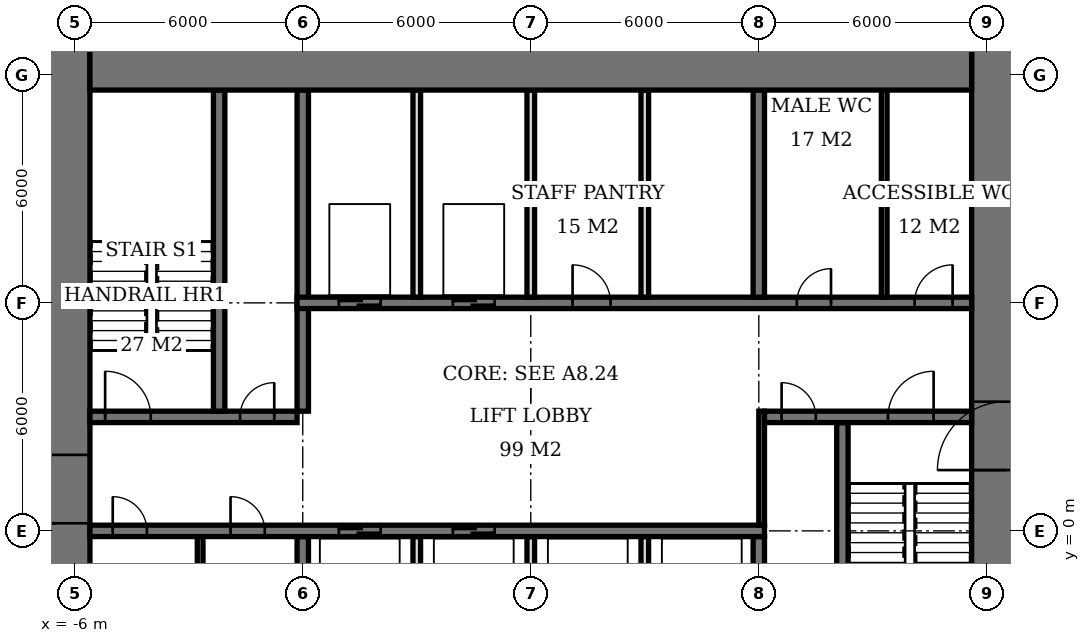
"""IFC4 building model, lengths in metres.
Left out: names, types, materials, properties, quantities, classifications, styles, units other than length and angle.
Written with IfcOpenShell. Run it as: python <this file> out.ifc"""

import sys

from ifc_helpers import new_model, si_unit, direction, frame, frame_2d, origin, place, context, subcontext, project, spatial, rectangle, extrude, element, fill, save


model = new_model("IFC4")
c1 = context("Model", 3, precision=1e-05, world=origin(), true_north=direction((0.0, 1.0)))
c2 = subcontext(c1, "Body", "Model", "MODEL_VIEW")
j1 = project(units=[si_unit("LENGTHUNIT", "METRE"), si_unit("PLANEANGLEUNIT", "RADIAN")], contexts=[c1])
p1 = place(None, origin())
s1 = spatial("IfcSite", under=j1, at=p1, CompositionType="ELEMENT")
p2 = place(p1, origin())
s2 = spatial("IfcBuilding", under=s1, at=p2, CompositionType="ELEMENT")
p3 = place(p2, frame((0.0, 0.0, 121.1)))
s3 = spatial("IfcBuildingStorey", under=s2, at=p3, CompositionType="ELEMENT", Elevation=121.1)
p4 = place(p3, frame((-5.6, 12.6, 0.0), z_axis=(0.0, 0.0, 1.0), x_axis=(1.0, 0.0, 0.0)))
e1 = element("IfcWall", 1, at=p4, inside=s3, PredefinedType="SHEAR", context=c2, shape_type="SweptSolid", body=[
    extrude(rectangle(XDim=23.2, YDim=2.0, at=frame_2d((11.6, 0.0))), origin(), (0.0, 0.0, 1.0), 3.9),
])
p5 = place(p3, frame((-6.5, -7.6, 0.0), z_axis=(0.0, 0.0, 1.0), x_axis=(0.0, 1.0, 0.0)))
e2 = element("IfcWall", 2, at=p5, inside=s3, PredefinedType="SHEAR", context=c2, shape_type="SweptSolid", body=[
    extrude(rectangle(XDim=21.2, YDim=1.8, at=frame_2d((10.6, 0.0))), origin(), (0.0, 0.0, 1.0), 3.9),
])
p6 = place(p5, frame((7.8, 0.0, 0.0)))
e3 = element("IfcOpeningElement", 3, at=p6, cuts=e2, PredefinedType="OPENING", context=c2, shape_type="SweptSolid", body=[
    extrude(rectangle(XDim=1.8, YDim=2.4, at=frame_2d((0.9, 1.2))), frame((0.0, 0.91, 0.0), z_axis=(0.0, -1.0, 0.0), x_axis=(1.0, 0.0, 0.0)), (0.0, 0.0, 1.0), 1.82),
])
p7 = place(p3, frame((18.5, -7.6, 0.0), z_axis=(0.0, 0.0, 1.0), x_axis=(0.0, 1.0, 0.0)))
e4 = element("IfcWall", 4, at=p7, inside=s3, PredefinedType="SHEAR", context=c2, shape_type="SweptSolid", body=[
    extrude(rectangle(XDim=21.2, YDim=1.8, at=frame_2d((10.6, 0.0))), origin(), (0.0, 0.0, 1.0), 3.9),
])
p8 = place(p7, frame((9.2, 0.0, 0.0)))
e5 = element("IfcOpeningElement", 5, at=p8, cuts=e4, PredefinedType="OPENING", context=c2, shape_type="SweptSolid", body=[
    extrude(rectangle(XDim=1.8, YDim=2.4, at=frame_2d((0.9, 1.2))), frame((0.0, 0.91, 0.0), z_axis=(0.0, -1.0, 0.0), x_axis=(1.0, 0.0, 0.0)), (0.0, 0.0, 1.0), 1.82),
])
p9 = place(p3, frame((-5.6, 0.0, 0.0), z_axis=(0.0, 0.0, 1.0), x_axis=(1.0, 0.0, 0.0)))
e6 = element("IfcWall", 6, at=p9, inside=s3, PredefinedType="SHEAR", context=c2, shape_type="SweptSolid", body=[
    extrude(rectangle(XDim=17.75, YDim=0.3, at=frame_2d((8.875, 0.0))), origin(), (0.0, 0.0, 1.0), 3.9),
])
p10 = place(p9, frame((0.6, 0.0, 0.0)))
e7 = element("IfcOpeningElement", 7, at=p10, cuts=e6, PredefinedType="OPENING", context=c2, shape_type="SweptSolid", body=[
    extrude(rectangle(XDim=0.9, YDim=2.1, at=frame_2d((0.45, 1.05))), frame((0.0, 0.16, 0.0), z_axis=(0.0, -1.0, 0.0), x_axis=(1.0, 0.0, 0.0)), (0.0, 0.0, 1.0), 0.32),
])
p11 = place(p9, frame((3.7, 0.0, 0.0)))
e8 = element("IfcOpeningElement", 8, at=p11, cuts=e6, PredefinedType="OPENING", context=c2, shape_type="SweptSolid", body=[
    extrude(rectangle(XDim=0.9, YDim=2.1, at=frame_2d((0.45, 1.05))), frame((0.0, 0.16, 0.0), z_axis=(0.0, -1.0, 0.0), x_axis=(1.0, 0.0, 0.0)), (0.0, 0.0, 1.0), 0.32),
])
p12 = place(p9, frame((6.55, 0.0, 0.0)))
e9 = element("IfcOpeningElement", 9, at=p12, cuts=e6, PredefinedType="OPENING", context=c2, shape_type="SweptSolid", body=[
    extrude(rectangle(XDim=1.1, YDim=2.1, at=frame_2d((0.55, 1.05))), frame((0.0, 0.16, 0.0), z_axis=(0.0, -1.0, 0.0), x_axis=(1.0, 0.0, 0.0)), (0.0, 0.0, 1.0), 0.32),
])
p13 = place(p9, frame((9.55, 0.0, 0.0)))
e10 = element("IfcOpeningElement", 10, at=p13, cuts=e6, PredefinedType="OPENING", context=c2, shape_type="SweptSolid", body=[
    extrude(rectangle(XDim=1.1, YDim=2.1, at=frame_2d((0.55, 1.05))), frame((0.0, 0.16, 0.0), z_axis=(0.0, -1.0, 0.0), x_axis=(1.0, 0.0, 0.0)), (0.0, 0.0, 1.0), 0.32),
])
p14 = place(p3, frame((-5.6, 3.0, 0.0), z_axis=(0.0, 0.0, 1.0), x_axis=(1.0, 0.0, 0.0)))
e11 = element("IfcWall", 11, at=p14, inside=s3, PredefinedType="SHEAR", context=c2, shape_type="SweptSolid", body=[
    extrude(rectangle(XDim=5.45, YDim=0.3, at=frame_2d((2.725, 0.0))), origin(), (0.0, 0.0, 1.0), 3.9),
])
p15 = place(p14, frame((0.4, 0.0, 0.0)))
e12 = element("IfcOpeningElement", 12, at=p15, cuts=e11, PredefinedType="OPENING", context=c2, shape_type="SweptSolid", body=[
    extrude(rectangle(XDim=1.2, YDim=2.1, at=frame_2d((0.6, 1.05))), frame((0.0, 0.16, 0.0), z_axis=(0.0, -1.0, 0.0), x_axis=(1.0, 0.0, 0.0)), (0.0, 0.0, 1.0), 0.32),
])
p16 = place(p14, frame((3.95, 0.0, 0.0)))
e13 = element("IfcOpeningElement", 13, at=p16, cuts=e11, PredefinedType="OPENING", context=c2, shape_type="SweptSolid", body=[
    extrude(rectangle(XDim=0.9, YDim=2.1, at=frame_2d((0.45, 1.05))), frame((0.0, 0.16, 0.0), z_axis=(0.0, -1.0, 0.0), x_axis=(1.0, 0.0, 0.0)), (0.0, 0.0, 1.0), 0.32),
])
p17 = place(p3, frame((12.15, 3.0, 0.0), z_axis=(0.0, 0.0, 1.0), x_axis=(1.0, 0.0, 0.0)))
e14 = element("IfcWall", 14, at=p17, inside=s3, PredefinedType="SHEAR", context=c2, shape_type="SweptSolid", body=[
    extrude(rectangle(XDim=5.45, YDim=0.3, at=frame_2d((2.725, 0.0))), origin(), (0.0, 0.0, 1.0), 3.9),
])
p18 = place(p17, frame((3.25, 0.0, 0.0)))
e15 = element("IfcOpeningElement", 15, at=p18, cuts=e14, PredefinedType="OPENING", context=c2, shape_type="SweptSolid", body=[
    extrude(rectangle(XDim=1.2, YDim=2.1, at=frame_2d((0.6, 1.05))), frame((0.0, 0.16, 0.0), z_axis=(0.0, -1.0, 0.0), x_axis=(1.0, 0.0, 0.0)), (0.0, 0.0, 1.0), 0.32),
])
p19 = place(p17, frame((0.45, 0.0, 0.0)))
e16 = element("IfcOpeningElement", 16, at=p19, cuts=e14, PredefinedType="OPENING", context=c2, shape_type="SweptSolid", body=[
    extrude(rectangle(XDim=0.9, YDim=2.1, at=frame_2d((0.45, 1.05))), frame((0.0, 0.16, 0.0), z_axis=(0.0, -1.0, 0.0), x_axis=(1.0, 0.0, 0.0)), (0.0, 0.0, 1.0), 0.32),
])
p20 = place(p3, frame((-0.15, 6.0, 0.0), z_axis=(0.0, 0.0, 1.0), x_axis=(1.0, 0.0, 0.0)))
e17 = element("IfcWall", 17, at=p20, inside=s3, PredefinedType="SHEAR", context=c2, shape_type="SweptSolid", body=[
    extrude(rectangle(XDim=17.75, YDim=0.3, at=frame_2d((8.875, 0.0))), origin(), (0.0, 0.0, 1.0), 3.9),
])
p21 = place(p20, frame((13.15, 0.0, 0.0)))
e18 = element("IfcOpeningElement", 18, at=p21, cuts=e17, PredefinedType="OPENING", context=c2, shape_type="SweptSolid", body=[
    extrude(rectangle(XDim=0.9, YDim=2.1, at=frame_2d((0.45, 1.05))), frame((0.0, 0.16, 0.0), z_axis=(0.0, -1.0, 0.0), x_axis=(1.0, 0.0, 0.0)), (0.0, 0.0, 1.0), 0.32),
])
p22 = place(p20, frame((16.25, 0.0, 0.0)))
e19 = element("IfcOpeningElement", 19, at=p22, cuts=e17, PredefinedType="OPENING", context=c2, shape_type="SweptSolid", body=[
    extrude(rectangle(XDim=1.0, YDim=2.1, at=frame_2d((0.5, 1.05))), frame((0.0, 0.16, 0.0), z_axis=(0.0, -1.0, 0.0), x_axis=(1.0, 0.0, 0.0)), (0.0, 0.0, 1.0), 0.32),
])
p23 = place(p20, frame((7.25, 0.0, 0.0)))
e20 = element("IfcOpeningElement", 20, at=p23, cuts=e17, PredefinedType="OPENING", context=c2, shape_type="SweptSolid", body=[
    extrude(rectangle(XDim=1.0, YDim=2.1, at=frame_2d((0.5, 1.05))), frame((0.0, 0.16, 0.0), z_axis=(0.0, -1.0, 0.0), x_axis=(1.0, 0.0, 0.0)), (0.0, 0.0, 1.0), 0.32),
])
p24 = place(p20, frame((1.1, 0.0, 0.0)))
e21 = element("IfcOpeningElement", 21, at=p24, cuts=e17, PredefinedType="OPENING", context=c2, shape_type="SweptSolid", body=[
    extrude(rectangle(XDim=1.1, YDim=2.1, at=frame_2d((0.55, 1.05))), frame((0.0, 0.16, 0.0), z_axis=(0.0, -1.0, 0.0), x_axis=(1.0, 0.0, 0.0)), (0.0, 0.0, 1.0), 0.32),
])
p25 = place(p20, frame((4.1, 0.0, 0.0)))
e22 = element("IfcOpeningElement", 22, at=p25, cuts=e17, PredefinedType="OPENING", context=c2, shape_type="SweptSolid", body=[
    extrude(rectangle(XDim=1.1, YDim=2.1, at=frame_2d((0.55, 1.05))), frame((0.0, 0.16, 0.0), z_axis=(0.0, -1.0, 0.0), x_axis=(1.0, 0.0, 0.0)), (0.0, 0.0, 1.0), 0.32),
])
p26 = place(p3, frame((0.0, -5.6, 0.0), z_axis=(0.0, 0.0, 1.0), x_axis=(0.0, 1.0, 0.0)))
e23 = element("IfcWall", 23, at=p26, inside=s3, PredefinedType="SHEAR", context=c2, shape_type="SweptSolid", body=[
    extrude(rectangle(XDim=5.45, YDim=0.3, at=frame_2d((2.725, 0.0))), origin(), (0.0, 0.0, 1.0), 3.9),
])
p27 = place(p3, frame((0.0, 3.15, 0.0), z_axis=(0.0, 0.0, 1.0), x_axis=(0.0, 1.0, 0.0)))
e24 = element("IfcWall", 24, at=p27, inside=s3, PredefinedType="SHEAR", context=c2, shape_type="SweptSolid", body=[
    extrude(rectangle(XDim=8.45, YDim=0.3, at=frame_2d((4.225, 0.0))), origin(), (0.0, 0.0, 1.0), 3.9),
])
for number, where, z_axis, x_axis in (
    (25, (12.0, -5.6, 0.0), (0.0, 0.0, 1.0), (0.0, 1.0, 0.0)),
    (26, (12.0, 6.15, 0.0), (0.0, 0.0, 1.0), (0.0, 1.0, 0.0)),
):
    element("IfcWall", number, at=place(p3, frame(where, z_axis=z_axis, x_axis=x_axis)), inside=s3, PredefinedType="SHEAR", context=c2, shape_type="SweptSolid", body=[
        extrude(rectangle(XDim=5.45, YDim=0.3, at=frame_2d((2.725, 0.0))), origin(), (0.0, 0.0, 1.0), 3.9),
    ])
for number, where, z_axis, x_axis in (
    (27, (-2.2, 3.15, 0.0), (0.0, 0.0, 1.0), (0.0, 1.0, 0.0)),
    (28, (14.2, -5.6, 0.0), (0.0, 0.0, 1.0), (0.0, 1.0, 0.0)),
):
    element("IfcWall", number, at=place(p3, frame(where, z_axis=z_axis, x_axis=x_axis)), inside=s3, PredefinedType="SHEAR", context=c2, shape_type="SweptSolid", body=[
        extrude(rectangle(XDim=8.45, YDim=0.3, at=frame_2d((4.225, 0.0))), origin(), (0.0, 0.0, 1.0), 3.9),
    ])
for number, where, z_axis, x_axis in (
    (29, (3.0, 6.15, 0.0), (0.0, 0.0, 1.0), (0.0, 1.0, 0.0)),
    (30, (6.0, 6.15, 0.0), (0.0, 0.0, 1.0), (0.0, 1.0, 0.0)),
    (31, (9.0, 6.15, 0.0), (0.0, 0.0, 1.0), (0.0, 1.0, 0.0)),
    (32, (3.0, -5.6, 0.0), (0.0, 0.0, 1.0), (0.0, 1.0, 0.0)),
    (33, (6.0, -5.6, 0.0), (0.0, 0.0, 1.0), (0.0, 1.0, 0.0)),
    (34, (9.0, -5.6, 0.0), (0.0, 0.0, 1.0), (0.0, 1.0, 0.0)),
):
    element("IfcWall", number, at=place(p3, frame(where, z_axis=z_axis, x_axis=x_axis)), inside=s3, PredefinedType="SOLIDWALL", context=c2, shape_type="SweptSolid", body=[
        extrude(rectangle(XDim=5.45, YDim=0.2, at=frame_2d((2.725, 0.0))), origin(), (0.0, 0.0, 1.0), 3.9),
    ])
for number, where, z_axis, x_axis in (
    (35, (-2.7, -5.6, 0.0), (0.0, 0.0, 1.0), (0.0, 1.0, 0.0)),
    (36, (15.3, 6.15, 0.0), (0.0, 0.0, 1.0), (0.0, 1.0, 0.0)),
):
    element("IfcWall", number, at=place(p3, frame(where, z_axis=z_axis, x_axis=x_axis)), inside=s3, PredefinedType="PLUMBINGWALL", context=c2, shape_type="SweptSolid", body=[
        extrude(rectangle(XDim=5.45, YDim=0.15, at=frame_2d((2.725, 0.0))), origin(), (0.0, 0.0, 1.0), 3.65),
    ])
p28 = place(p3, frame((12.075, 0.15, 0.0), z_axis=(0.0, 0.0, 1.0), x_axis=(0.0, 1.0, 0.0)))
e37 = element("IfcWall", 37, at=p28, inside=s3, PredefinedType="PARTITIONING", context=c2, shape_type="SweptSolid", body=[
    extrude(rectangle(XDim=3.0, YDim=0.15, at=frame_2d((1.5, 0.0))), origin(), (0.0, 0.0, 1.0), 3.65),
])
p29 = place(p6, origin())
e38 = element("IfcDoor", 38, at=p29, inside=s3, OperationType="DOUBLE_DOOR_SINGLE_SWING", PredefinedType="DOOR", context=c2, shape_type="SweptSolid", body=[
    extrude(rectangle(XDim=1.8, YDim=2.4, at=frame_2d((0.9, 1.2))), frame((0.0, 0.025, 0.0), z_axis=(0.0, -1.0, 0.0), x_axis=(1.0, 0.0, 0.0)), (0.0, 0.0, 1.0), 0.05),
])
fill(e3, e38)
p30 = place(p8, origin())
e39 = element("IfcDoor", 39, at=p30, inside=s3, OperationType="DOUBLE_DOOR_SINGLE_SWING", PredefinedType="DOOR", context=c2, shape_type="SweptSolid", body=[
    extrude(rectangle(XDim=1.8, YDim=2.4, at=frame_2d((0.9, 1.2))), frame((0.0, 0.025, 0.0), z_axis=(0.0, -1.0, 0.0), x_axis=(1.0, 0.0, 0.0)), (0.0, 0.0, 1.0), 0.05),
])
fill(e5, e39)
p31 = place(p15, origin())
e40 = element("IfcDoor", 40, at=p31, inside=s3, OperationType="SINGLE_SWING_LEFT", PredefinedType="DOOR", context=c2, shape_type="SweptSolid", body=[
    extrude(rectangle(XDim=1.2, YDim=2.1, at=frame_2d((0.6, 1.05))), frame((0.0, 0.025, 0.0), z_axis=(0.0, -1.0, 0.0), x_axis=(1.0, 0.0, 0.0)), (0.0, 0.0, 1.0), 0.05),
])
fill(e12, e40)
p32 = place(p16, origin())
e41 = element("IfcDoor", 41, at=p32, inside=s3, OperationType="SINGLE_SWING_RIGHT", PredefinedType="DOOR", context=c2, shape_type="SweptSolid", body=[
    extrude(rectangle(XDim=0.9, YDim=2.1, at=frame_2d((0.45, 1.05))), frame((0.0, 0.025, 0.0), z_axis=(0.0, -1.0, 0.0), x_axis=(1.0, 0.0, 0.0)), (0.0, 0.0, 1.0), 0.05),
])
fill(e13, e41)
p33 = place(p18, origin())
e42 = element("IfcDoor", 42, at=p33, inside=s3, OperationType="SINGLE_SWING_RIGHT", PredefinedType="DOOR", context=c2, shape_type="SweptSolid", body=[
    extrude(rectangle(XDim=1.2, YDim=2.1, at=frame_2d((0.6, 1.05))), frame((0.0, 0.025, 0.0), z_axis=(0.0, -1.0, 0.0), x_axis=(1.0, 0.0, 0.0)), (0.0, 0.0, 1.0), 0.05),
])
fill(e15, e42)
p34 = place(p19, origin())
e43 = element("IfcDoor", 43, at=p34, inside=s3, OperationType="SINGLE_SWING_LEFT", PredefinedType="DOOR", context=c2, shape_type="SweptSolid", body=[
    extrude(rectangle(XDim=0.9, YDim=2.1, at=frame_2d((0.45, 1.05))), frame((0.0, 0.025, 0.0), z_axis=(0.0, -1.0, 0.0), x_axis=(1.0, 0.0, 0.0)), (0.0, 0.0, 1.0), 0.05),
])
fill(e16, e43)
p35 = place(p10, origin())
e44 = element("IfcDoor", 44, at=p35, inside=s3, OperationType="SINGLE_SWING_LEFT", PredefinedType="DOOR", context=c2, shape_type="SweptSolid", body=[
    extrude(rectangle(XDim=0.9, YDim=2.1, at=frame_2d((0.45, 1.05))), frame((0.0, 0.025, 0.0), z_axis=(0.0, -1.0, 0.0), x_axis=(1.0, 0.0, 0.0)), (0.0, 0.0, 1.0), 0.05),
])
fill(e7, e44)
p36 = place(p11, origin())
e45 = element("IfcDoor", 45, at=p36, inside=s3, OperationType="SINGLE_SWING_LEFT", PredefinedType="DOOR", context=c2, shape_type="SweptSolid", body=[
    extrude(rectangle(XDim=0.9, YDim=2.1, at=frame_2d((0.45, 1.05))), frame((0.0, 0.025, 0.0), z_axis=(0.0, -1.0, 0.0), x_axis=(1.0, 0.0, 0.0)), (0.0, 0.0, 1.0), 0.05),
])
fill(e8, e45)
p37 = place(p21, origin())
e46 = element("IfcDoor", 46, at=p37, inside=s3, OperationType="SINGLE_SWING_RIGHT", PredefinedType="DOOR", context=c2, shape_type="SweptSolid", body=[
    extrude(rectangle(XDim=0.9, YDim=2.1, at=frame_2d((0.45, 1.05))), frame((0.0, 0.025, 0.0), z_axis=(0.0, -1.0, 0.0), x_axis=(1.0, 0.0, 0.0)), (0.0, 0.0, 1.0), 0.05),
])
fill(e18, e46)
p38 = place(p22, origin())
e47 = element("IfcDoor", 47, at=p38, inside=s3, OperationType="SINGLE_SWING_RIGHT", PredefinedType="DOOR", context=c2, shape_type="SweptSolid", body=[
    extrude(rectangle(XDim=1.0, YDim=2.1, at=frame_2d((0.5, 1.05))), frame((0.0, 0.025, 0.0), z_axis=(0.0, -1.0, 0.0), x_axis=(1.0, 0.0, 0.0)), (0.0, 0.0, 1.0), 0.05),
])
fill(e19, e47)
p39 = place(p23, origin())
e48 = element("IfcDoor", 48, at=p39, inside=s3, OperationType="SINGLE_SWING_LEFT", PredefinedType="DOOR", context=c2, shape_type="SweptSolid", body=[
    extrude(rectangle(XDim=1.0, YDim=2.1, at=frame_2d((0.5, 1.05))), frame((0.0, 0.025, 0.0), z_axis=(0.0, -1.0, 0.0), x_axis=(1.0, 0.0, 0.0)), (0.0, 0.0, 1.0), 0.05),
])
fill(e20, e48)
p40 = place(p24, origin())
e49 = element("IfcDoor", 49, at=p40, inside=s3, OperationType="DOUBLE_DOOR_SLIDING", PredefinedType="USERDEFINED", context=c2, shape_type="SweptSolid", body=[
    extrude(rectangle(XDim=1.1, YDim=2.1, at=frame_2d((0.55, 1.05))), frame((0.0, 0.025, 0.0), z_axis=(0.0, -1.0, 0.0), x_axis=(1.0, 0.0, 0.0)), (0.0, 0.0, 1.0), 0.05),
])
fill(e21, e49)
p41 = place(p25, origin())
e50 = element("IfcDoor", 50, at=p41, inside=s3, OperationType="DOUBLE_DOOR_SLIDING", PredefinedType="USERDEFINED", context=c2, shape_type="SweptSolid", body=[
    extrude(rectangle(XDim=1.1, YDim=2.1, at=frame_2d((0.55, 1.05))), frame((0.0, 0.025, 0.0), z_axis=(0.0, -1.0, 0.0), x_axis=(1.0, 0.0, 0.0)), (0.0, 0.0, 1.0), 0.05),
])
fill(e22, e50)
p42 = place(p12, origin())
e51 = element("IfcDoor", 51, at=p42, inside=s3, OperationType="DOUBLE_DOOR_SLIDING", PredefinedType="USERDEFINED", context=c2, shape_type="SweptSolid", body=[
    extrude(rectangle(XDim=1.1, YDim=2.1, at=frame_2d((0.55, 1.05))), frame((0.0, 0.025, 0.0), z_axis=(0.0, -1.0, 0.0), x_axis=(1.0, 0.0, 0.0)), (0.0, 0.0, 1.0), 0.05),
])
fill(e9, e51)
p43 = place(p13, origin())
e52 = element("IfcDoor", 52, at=p43, inside=s3, OperationType="DOUBLE_DOOR_SLIDING", PredefinedType="USERDEFINED", context=c2, shape_type="SweptSolid", body=[
    extrude(rectangle(XDim=1.1, YDim=2.1, at=frame_2d((0.55, 1.05))), frame((0.0, 0.025, 0.0), z_axis=(0.0, -1.0, 0.0), x_axis=(1.0, 0.0, 0.0)), (0.0, 0.0, 1.0), 0.05),
])
fill(e10, e52)
save(model, sys.argv[1])
